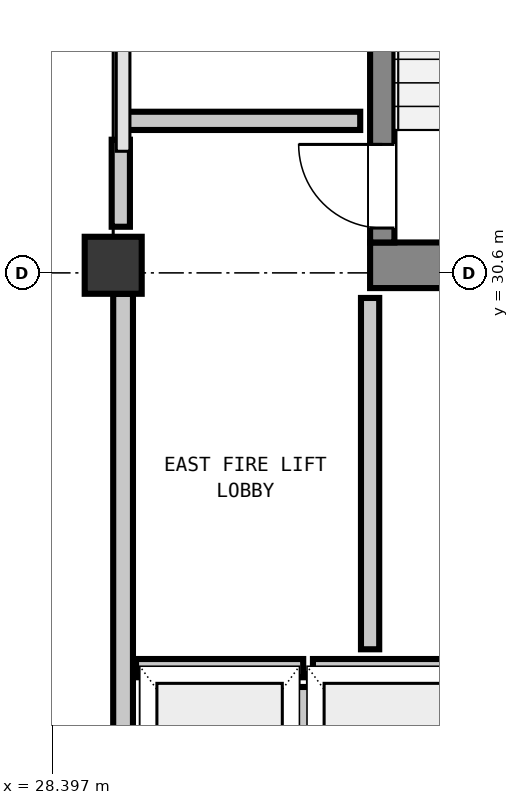
"""IFC4 building model, lengths in metres.
Left out: names, types, materials, properties, quantities, classifications, styles, units other than length and angle.
Written with IfcOpenShell. Run it as: python <this file> out.ifc"""

import sys

from ifc_helpers import new_model, si_unit, direction, frame, frame_2d, origin, origin_2d, place, context, subcontext, project, spatial, rectangle, extrude, element, fill, save


model = new_model("IFC4")
c1 = context("Model", 3, precision=1e-05, world=origin(), true_north=direction((0.0, 1.0)))
c2 = subcontext(c1, "Body", "Model", "MODEL_VIEW")
j1 = project(units=[si_unit("LENGTHUNIT", "METRE"), si_unit("PLANEANGLEUNIT", "RADIAN")], contexts=[c1])
p1 = place(None, origin())
s1 = spatial("IfcSite", under=j1, at=p1, CompositionType="ELEMENT")
p2 = place(p1, origin())
s2 = spatial("IfcBuilding", under=s1, at=p2, CompositionType="ELEMENT")
p3 = place(p2, frame((0.0, 0.0, 292.78)))
s3 = spatial("IfcBuildingStorey", under=s2, at=p3, CompositionType="ELEMENT", Elevation=292.78)
p4 = place(p3, frame((32.58, 30.7, 0.0), z_axis=(0.0, 0.0, 1.0), x_axis=(1.0, 0.0, 0.0)))
e1 = element("IfcWall", 1, at=p4, inside=s3, PredefinedType="SHEAR", context=c2, shape_type="SweptSolid", body=[
    extrude(rectangle(XDim=4.08, YDim=0.6, at=frame_2d((2.04, 0.0))), origin(), (0.0, 0.0, 1.0), 4.9),
])
p5 = place(p3, frame((32.74, 31.0, 0.0), z_axis=(0.0, 0.0, 1.0), x_axis=(0.0, 1.0, 0.0)))
e2 = element("IfcWall", 2, at=p5, inside=s3, PredefinedType="SHEAR", context=c2, shape_type="SweptSolid", body=[
    extrude(rectangle(XDim=7.8, YDim=0.32, at=frame_2d((3.9, 0.0))), origin(), (0.0, 0.0, 1.0), 4.9),
])
p6 = place(p5, frame((0.19, 0.0, 0.0)))
e3 = element("IfcOpeningElement", 3, at=p6, cuts=e2, PredefinedType="OPENING", context=c2, shape_type="SweptSolid", body=[
    extrude(rectangle(XDim=1.1, YDim=2.15, at=frame_2d((0.55, 1.075))), frame((0.0, 0.17, 0.0), z_axis=(0.0, -1.0, 0.0), x_axis=(1.0, 0.0, 0.0)), (0.0, 0.0, 1.0), 0.34),
])
p7 = place(p3, frame((29.2, 30.7, 0.0), z_axis=(0.0, 0.0, 1.0), x_axis=(1.0, 0.0, 0.0)))
e4 = element("IfcColumn", 4, at=p7, inside=s3, PredefinedType="COLUMN", context=c2, shape_type="SweptSolid", body=[
    extrude(rectangle(XDim=0.75, YDim=0.75, at=origin_2d()), origin(), (0.0, 0.0, 1.0), 4.9),
])
p8 = place(p3, frame((29.33, 22.3, 0.0), z_axis=(0.0, 0.0, 1.0), x_axis=(0.0, 1.0, 0.0)))
e5 = element("IfcWall", 5, at=p8, inside=s3, PredefinedType="STANDARD", context=c2, shape_type="SweptSolid", body=[
    extrude(rectangle(XDim=8.025, YDim=0.26, at=frame_2d((4.012, 0.0))), origin(), (0.0, 0.0, 1.0), 3.754),
])
p9 = place(p3, frame((29.5, 25.4, 0.0), z_axis=(0.0, 0.0, 1.0), x_axis=(1.0, 0.0, 0.0)))
e6 = element("IfcWall", 6, at=p9, inside=s3, PredefinedType="PARTITIONING", context=c2, shape_type="SweptSolid", body=[
    extrude(rectangle(XDim=2.2, YDim=0.24, at=frame_2d((1.1, 0.0))), origin(), (0.0, 0.0, 1.0), 4.62),
])
p10 = place(p3, frame((31.7, 22.848, 0.0), z_axis=(0.0, 0.0, 1.0), x_axis=(0.0, 1.0, 0.0)))
e7 = element("IfcWall", 7, at=p10, inside=s3, PredefinedType="PARTITIONING", context=c2, shape_type="SweptSolid", body=[
    extrude(rectangle(XDim=2.304, YDim=0.24, at=frame_2d((1.152, 0.0))), origin(), (0.0, 0.0, 1.0), 4.62),
])
p11 = place(p3, frame((31.828, 25.4, 0.0), z_axis=(0.0, 0.0, 1.0), x_axis=(1.0, 0.0, 0.0)))
e8 = element("IfcWall", 8, at=p11, inside=s3, PredefinedType="PARTITIONING", context=c2, shape_type="SweptSolid", body=[
    extrude(rectangle(XDim=2.072, YDim=0.24, at=frame_2d((1.036, 0.0))), origin(), (0.0, 0.0, 1.0), 4.62),
])
p12 = place(p3, frame((29.3, 32.6, 0.0), z_axis=(0.0, 0.0, 1.0), x_axis=(1.0, 0.0, 0.0)))
e9 = element("IfcWall", 9, at=p12, inside=s3, PredefinedType="PARTITIONING", context=c2, shape_type="SweptSolid", body=[
    extrude(rectangle(XDim=3.15, YDim=0.24, at=frame_2d((1.575, 0.0))), origin(), (0.0, 0.0, 1.0), 4.62),
])
p13 = place(p3, frame((29.3, 31.207, 0.0), z_axis=(0.0, 0.0, 1.0), x_axis=(0.0, 1.0, 0.0)))
e10 = element("IfcWall", 10, at=p13, inside=s3, PredefinedType="PARTITIONING", context=c2, shape_type="SweptSolid", body=[
    extrude(rectangle(XDim=1.145, YDim=0.24, at=frame_2d((0.573, 0.0))), origin(), (0.0, 0.0, 1.0), 3.912),
])
p14 = place(p3, frame((32.58, 25.648, 0.0), z_axis=(0.0, 0.0, 1.0), x_axis=(0.0, 1.0, 0.0)))
e11 = element("IfcWall", 11, at=p14, inside=s3, PredefinedType="PARTITIONING", context=c2, shape_type="SweptSolid", body=[
    extrude(rectangle(XDim=4.622, YDim=0.24, at=frame_2d((2.311, 0.0))), origin(), (0.0, 0.0, 1.0), 4.62),
])
p15 = place(p6, origin())
e12 = element("IfcDoor", 12, at=p15, inside=s3, OperationType="SINGLE_SWING_RIGHT", PredefinedType="DOOR", context=c2, shape_type="SweptSolid", body=[
    extrude(rectangle(XDim=1.1, YDim=2.15, at=frame_2d((0.55, 1.075))), frame((0.0, 0.025, 0.0), z_axis=(0.0, -1.0, 0.0), x_axis=(1.0, 0.0, 0.0)), (0.0, 0.0, 1.0), 0.05),
])
fill(e3, e12)
save(model, sys.argv[1])
